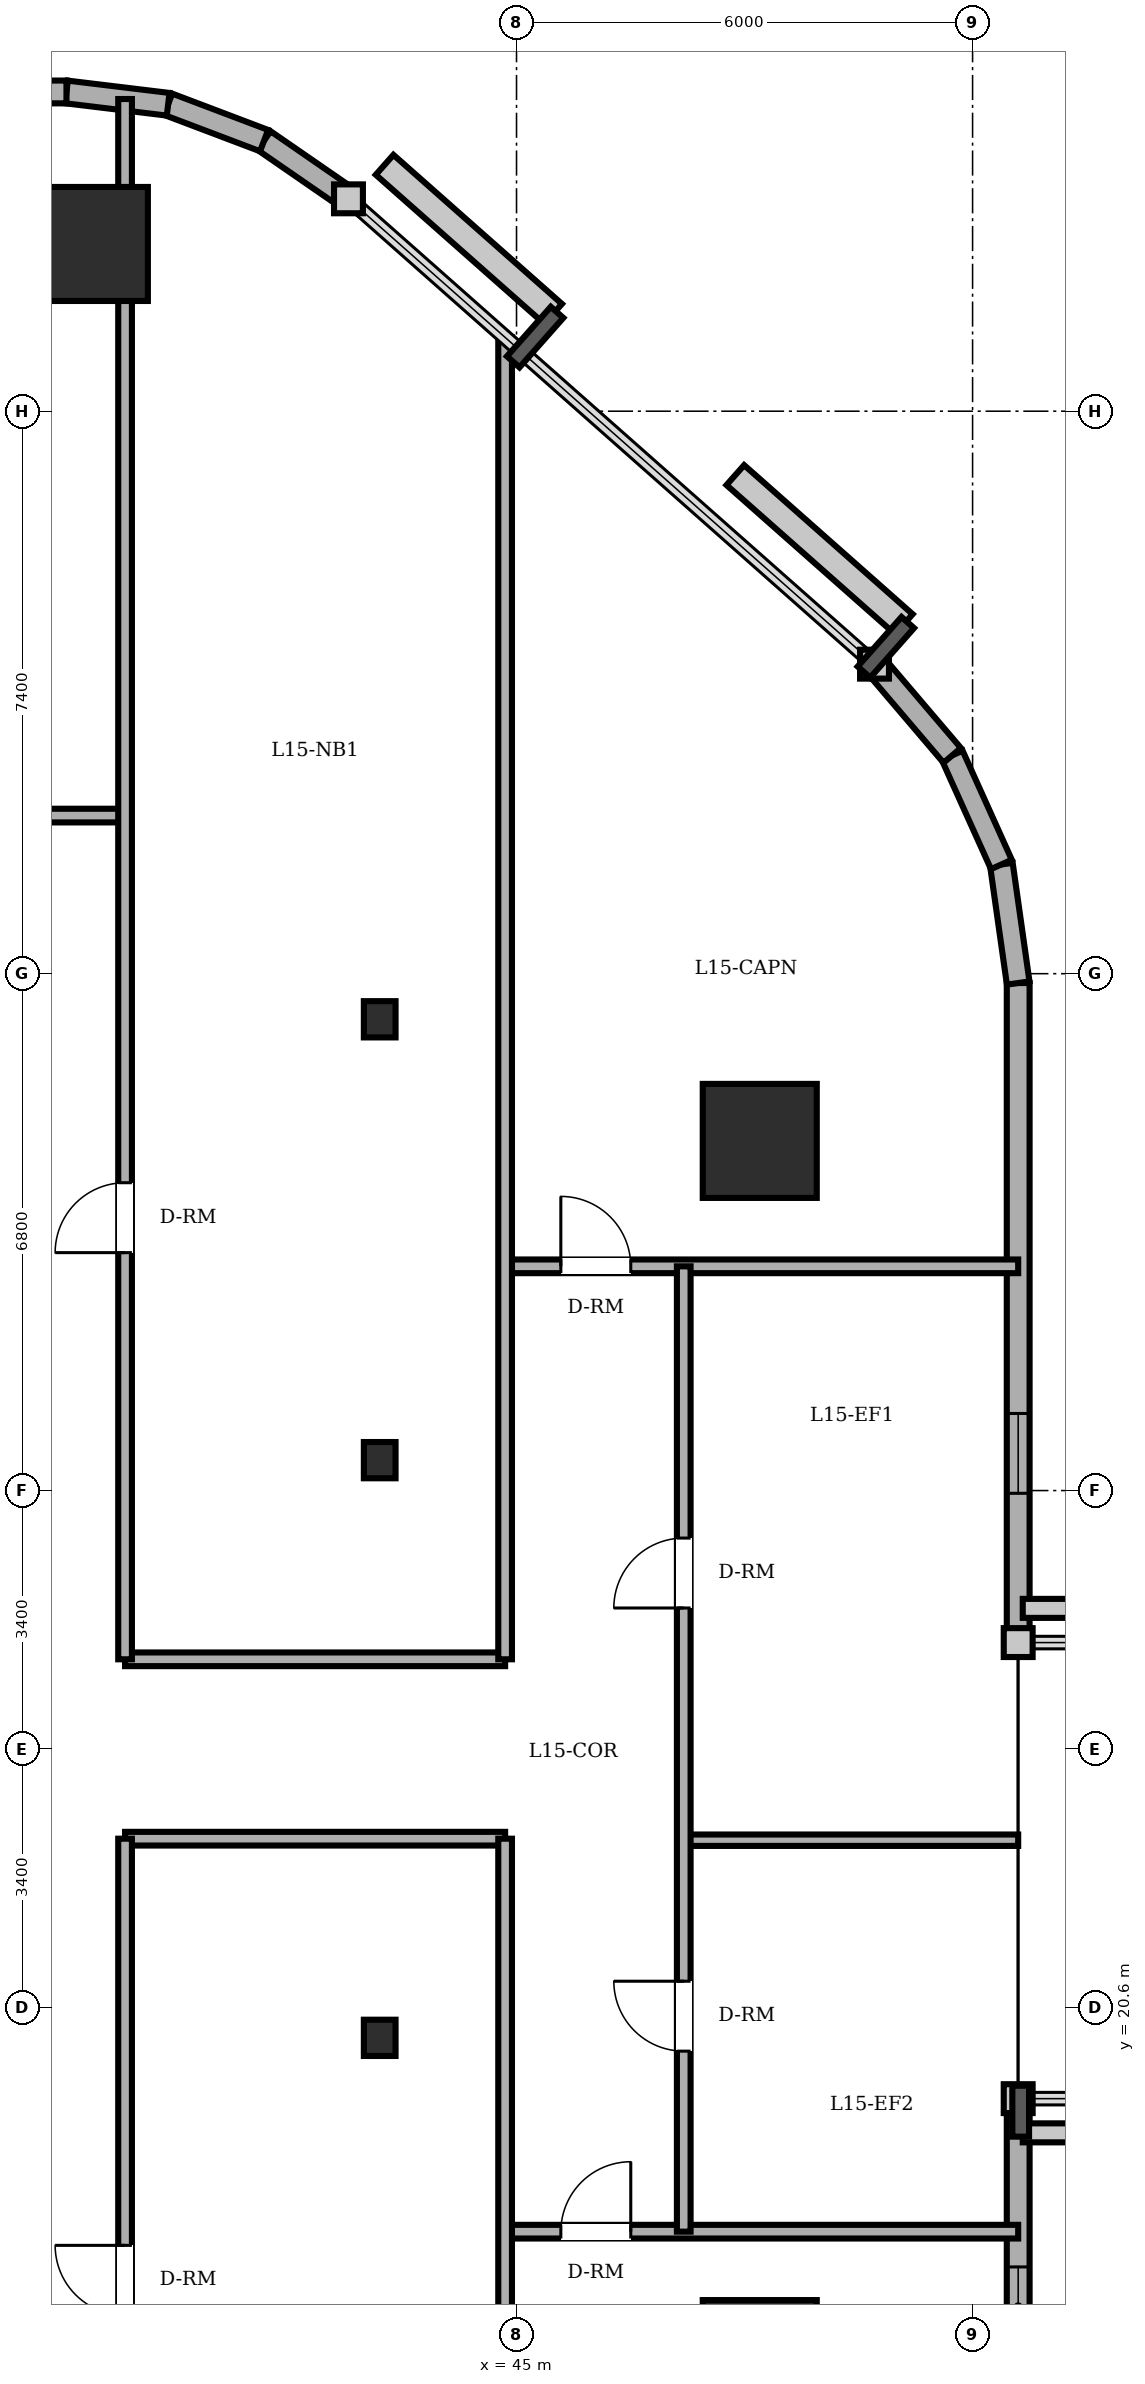
"""IFC4 building model, lengths in metres.
Left out: names, types, materials, properties, quantities, classifications, styles, units other than length and angle.
Written with IfcOpenShell. Run it as: python <this file> out.ifc"""

import sys

from ifc_helpers import new_model, si_unit, direction, frame, frame_2d, origin, origin_2d, place, context, subcontext, project, spatial, rectangle, circle, i_section, extrude, element, fill, save


model = new_model("IFC4")
c1 = context("Model", 3, precision=1e-05, world=origin(), true_north=direction((0.0, 1.0)))
c2 = subcontext(c1, "Body", "Model", "MODEL_VIEW")
j1 = project(units=[si_unit("LENGTHUNIT", "METRE"), si_unit("PLANEANGLEUNIT", "RADIAN")], contexts=[c1])
p1 = place(None, origin())
s1 = spatial("IfcSite", under=j1, at=p1, CompositionType="ELEMENT")
p2 = place(p1, origin())
s2 = spatial("IfcBuilding", under=s1, at=p2, CompositionType="ELEMENT")
p3 = place(p2, frame((0.0, 0.0, 57.6)))
s3 = spatial("IfcBuildingStorey", under=s2, at=p3, CompositionType="ELEMENT", Elevation=57.6)
for number, where, z_axis, x_axis in (
    (1, (48.2, 16.0, 0.0), (0.0, 0.0, 1.0), (1.0, 0.0, 0.0)),
    (2, (48.2, 32.0, 0.0), (0.0, 0.0, 1.0), (1.0, 0.0, 0.0)),
    (3, (39.4, 43.8, 0.0), (0.0, 0.0, 1.0), (1.0, 0.0, 0.0)),
):
    element("IfcColumn", number, at=place(p3, frame(where, z_axis=z_axis, x_axis=x_axis)), inside=s3, PredefinedType="COLUMN", context=c2, shape_type="SweptSolid", body=[
        extrude(circle(Radius=0.75, at=origin_2d()), origin(), (0.0, 0.0, 1.0), 3.6),
    ])
for number, where, z_axis, x_axis in (
    (4, (43.2, 20.2, 0.0), (0.0, 0.0, 1.0), (1.0, 0.0, 0.0)),
    (5, (43.2, 27.8, 0.0), (0.0, 0.0, 1.0), (1.0, 0.0, 0.0)),
    (6, (43.2, 33.6, 0.0), (0.0, 0.0, 1.0), (1.0, 0.0, 0.0)),
):
    element("IfcColumn", number, at=place(p3, frame(where, z_axis=z_axis, x_axis=x_axis)), inside=s3, PredefinedType="COLUMN", context=c2, shape_type="SweptSolid", body=[
        extrude(i_section(OverallWidth=0.417, OverallDepth=0.477, WebThickness=0.036, FlangeThickness=0.057, FilletRadius=0.015, at=origin_2d()), origin(), (0.0, 0.0, 1.0), 3.6),
    ])
p4 = place(p3, frame((51.6, 13.923, 0.0), z_axis=(0.0, 0.0, 1.0), x_axis=(0.0, 1.0, 0.0)))
e7 = element("IfcWall", 7, at=p4, inside=s3, PredefinedType="SOLIDWALL", context=c2, shape_type="SweptSolid", body=[
    extrude(rectangle(XDim=5.477, YDim=0.3, at=frame_2d((2.738, 0.0))), origin(), (0.0, 0.0, 1.0), 3.4),
])
p5 = place(p4, frame((2.213, 0.0, 0.85)))
e8 = element("IfcOpeningElement", 8, at=p5, cuts=e7, PredefinedType="OPENING", context=c2, shape_type="SweptSolid", body=[
    extrude(rectangle(XDim=1.05, YDim=1.55, at=frame_2d((0.525, 0.775))), frame((0.0, 0.16, 0.0), z_axis=(0.0, -1.0, 0.0), x_axis=(1.0, 0.0, 0.0)), (0.0, 0.0, 1.0), 0.32),
])
p6 = place(p3, frame((51.6, 25.4, 0.0), z_axis=(0.0, 0.0, 1.0), x_axis=(0.0, 1.0, 0.0)))
e9 = element("IfcWall", 9, at=p6, inside=s3, PredefinedType="SOLIDWALL", context=c2, shape_type="SweptSolid", body=[
    extrude(rectangle(XDim=8.677, YDim=0.3, at=frame_2d((4.338, 0.0))), origin(), (0.0, 0.0, 1.0), 3.4),
])
p7 = place(p6, frame((1.964, 0.0, 0.85)))
e10 = element("IfcOpeningElement", 10, at=p7, cuts=e9, PredefinedType="OPENING", context=c2, shape_type="SweptSolid", body=[
    extrude(rectangle(XDim=1.05, YDim=1.55, at=frame_2d((0.525, 0.775))), frame((0.0, 0.16, 0.0), z_axis=(0.0, -1.0, 0.0), x_axis=(1.0, 0.0, 0.0)), (0.0, 0.0, 1.0), 0.32),
])
p8 = place(p3, frame((51.6, 34.077, 0.0), z_axis=(0.0, 0.0, 1.0), x_axis=(-0.140380048512, 0.990097693149, 0.0)))
e11 = element("IfcWall", 11, at=p8, inside=s3, PredefinedType="SOLIDWALL", context=c2, shape_type="SweptSolid", body=[
    extrude(rectangle(XDim=1.576, YDim=0.3, at=frame_2d((0.788, 0.0))), origin(), (0.0, 0.0, 1.0), 3.4),
])
p9 = place(p3, frame((51.379, 35.637, 0.0), z_axis=(0.0, 0.0, 1.0), x_axis=(-0.410996558744, 0.911636895206, 0.0)))
e12 = element("IfcWall", 12, at=p9, inside=s3, PredefinedType="SOLIDWALL", context=c2, shape_type="SweptSolid", body=[
    extrude(rectangle(XDim=1.574, YDim=0.3, at=frame_2d((0.787, 0.0))), origin(), (0.0, 0.0, 1.0), 3.4),
])
p10 = place(p3, frame((50.732, 37.072, 0.0), z_axis=(0.0, 0.0, 1.0), x_axis=(-0.648389989909, 0.7613083613, 0.0)))
e13 = element("IfcWall", 13, at=p10, inside=s3, PredefinedType="SOLIDWALL", context=c2, shape_type="SweptSolid", body=[
    extrude(rectangle(XDim=1.576, YDim=0.3, at=frame_2d((0.788, 0.0))), origin(), (0.0, 0.0, 1.0), 3.4),
])
p11 = place(p3, frame((42.789, 44.394, 0.0), z_axis=(0.0, 0.0, 1.0), x_axis=(-0.823116500192, 0.567872544777, 0.0)))
e14 = element("IfcWall", 14, at=p11, inside=s3, PredefinedType="SOLIDWALL", context=c2, shape_type="SweptSolid", body=[
    extrude(rectangle(XDim=1.349, YDim=0.3, at=frame_2d((0.674, 0.0))), origin(), (0.0, 0.0, 1.0), 3.4),
])
p12 = place(p3, frame((41.679, 45.16, 0.0), z_axis=(0.0, 0.0, 1.0), x_axis=(-0.935156721165, 0.354234254216, 0.0)))
e15 = element("IfcWall", 15, at=p12, inside=s3, PredefinedType="SOLIDWALL", context=c2, shape_type="SweptSolid", body=[
    extrude(rectangle(XDim=1.349, YDim=0.3, at=frame_2d((0.675, 0.0))), origin(), (0.0, 0.0, 1.0), 3.4),
])
p13 = place(p3, frame((40.417, 45.638, 0.0), z_axis=(0.0, 0.0, 1.0), x_axis=(-0.992739027259, 0.120288086515, 0.0)))
e16 = element("IfcWall", 16, at=p13, inside=s3, PredefinedType="SOLIDWALL", context=c2, shape_type="SweptSolid", body=[
    extrude(rectangle(XDim=1.348, YDim=0.3, at=frame_2d((0.674, 0.0))), origin(), (0.0, 0.0, 1.0), 3.4),
])
p14 = place(p3, frame((39.079, 45.8, 0.0), z_axis=(0.0, 0.0, 1.0), x_axis=(-1.0, 0.0, 0.0)))
e17 = element("IfcWall", 17, at=p14, inside=s3, PredefinedType="SOLIDWALL", context=c2, shape_type="SweptSolid", body=[
    extrude(rectangle(XDim=30.079, YDim=0.3, at=frame_2d((15.04, 0.0))), origin(), (0.0, 0.0, 1.0), 3.4),
])
p15 = place(p14, frame((24.079, 0.0, 0.0)))
e18 = element("IfcOpeningElement", 18, at=p15, cuts=e17, PredefinedType="OPENING", context=c2, shape_type="SweptSolid", body=[
    extrude(rectangle(XDim=0.95, YDim=2.2, at=frame_2d((0.475, 1.1))), frame((0.0, 0.16, 0.0), z_axis=(0.0, -1.0, 0.0), x_axis=(1.0, 0.0, 0.0)), (0.0, 0.0, 1.0), 0.32),
])
p16 = place(p14, frame((2.226, 0.0, 0.85)))
e19 = element("IfcOpeningElement", 19, at=p16, cuts=e17, PredefinedType="OPENING", context=c2, shape_type="SweptSolid", body=[
    extrude(rectangle(XDim=1.8, YDim=1.55, at=frame_2d((0.9, 0.775))), frame((0.0, 0.16, 0.0), z_axis=(0.0, -1.0, 0.0), x_axis=(1.0, 0.0, 0.0)), (0.0, 0.0, 1.0), 0.32),
])
p17 = place(p14, frame((5.003, 0.0, 0.85)))
e20 = element("IfcOpeningElement", 20, at=p17, cuts=e17, PredefinedType="OPENING", context=c2, shape_type="SweptSolid", body=[
    extrude(rectangle(XDim=1.8, YDim=1.55, at=frame_2d((0.9, 0.775))), frame((0.0, 0.16, 0.0), z_axis=(0.0, -1.0, 0.0), x_axis=(1.0, 0.0, 0.0)), (0.0, 0.0, 1.0), 0.32),
])
p18 = place(p14, frame((10.179, 0.0, 0.85)))
e21 = element("IfcOpeningElement", 21, at=p18, cuts=e17, PredefinedType="OPENING", context=c2, shape_type="SweptSolid", body=[
    extrude(rectangle(XDim=1.8, YDim=1.55, at=frame_2d((0.9, 0.775))), frame((0.0, 0.16, 0.0), z_axis=(0.0, -1.0, 0.0), x_axis=(1.0, 0.0, 0.0)), (0.0, 0.0, 1.0), 0.32),
])
p19 = place(p14, frame((12.579, 0.0, 0.85)))
e22 = element("IfcOpeningElement", 22, at=p19, cuts=e17, PredefinedType="OPENING", context=c2, shape_type="SweptSolid", body=[
    extrude(rectangle(XDim=1.8, YDim=1.55, at=frame_2d((0.9, 0.775))), frame((0.0, 0.16, 0.0), z_axis=(0.0, -1.0, 0.0), x_axis=(1.0, 0.0, 0.0)), (0.0, 0.0, 1.0), 0.32),
])
p20 = place(p14, frame((19.596, 0.0, 0.85)))
e23 = element("IfcOpeningElement", 23, at=p20, cuts=e17, PredefinedType="OPENING", context=c2, shape_type="SweptSolid", body=[
    extrude(rectangle(XDim=1.8, YDim=1.55, at=frame_2d((0.9, 0.775))), frame((0.0, 0.16, 0.0), z_axis=(0.0, -1.0, 0.0), x_axis=(1.0, 0.0, 0.0)), (0.0, 0.0, 1.0), 0.32),
])
p21 = place(p3, frame((44.85, 17.65, 0.0), z_axis=(0.0, 0.0, 1.0), x_axis=(1.0, 0.0, 0.0)))
e24 = element("IfcWall", 24, at=p21, inside=s3, PredefinedType="PARTITIONING", context=c2, shape_type="SweptSolid", body=[
    extrude(rectangle(XDim=6.75, YDim=0.18, at=frame_2d((3.375, 0.0))), origin(), (0.0, 0.0, 1.0), 3.4),
])
p22 = place(p21, frame((0.733, 0.0, 0.0)))
e25 = element("IfcOpeningElement", 25, at=p22, cuts=e24, PredefinedType="OPENING", context=c2, shape_type="SweptSolid", body=[
    extrude(rectangle(XDim=0.92, YDim=2.1, at=frame_2d((0.46, 1.05))), frame((0.0, 0.1, 0.0), z_axis=(0.0, -1.0, 0.0), x_axis=(1.0, 0.0, 0.0)), (0.0, 0.0, 1.0), 0.2),
])
p23 = place(p3, frame((39.85, 22.82, 0.0), z_axis=(0.0, 0.0, 1.0), x_axis=(1.0, 0.0, 0.0)))
e26 = element("IfcWall", 26, at=p23, inside=s3, PredefinedType="PARTITIONING", context=c2, shape_type="SweptSolid", body=[
    extrude(rectangle(XDim=5.0, YDim=0.18, at=frame_2d((2.5, 0.0))), origin(), (0.0, 0.0, 1.0), 3.4),
])
p24 = place(p3, frame((47.2, 22.8, 0.0), z_axis=(0.0, 0.0, 1.0), x_axis=(1.0, 0.0, 0.0)))
e27 = element("IfcWall", 27, at=p24, inside=s3, PredefinedType="PARTITIONING", context=c2, shape_type="SweptSolid", body=[
    extrude(rectangle(XDim=4.4, YDim=0.15, at=frame_2d((2.2, 0.0))), origin(), (0.0, 0.0, 1.0), 3.4),
])
p25 = place(p3, frame((39.85, 25.18, 0.0), z_axis=(0.0, 0.0, 1.0), x_axis=(1.0, 0.0, 0.0)))
e28 = element("IfcWall", 28, at=p25, inside=s3, PredefinedType="PARTITIONING", context=c2, shape_type="SweptSolid", body=[
    extrude(rectangle(XDim=5.0, YDim=0.18, at=frame_2d((2.5, 0.0))), origin(), (0.0, 0.0, 1.0), 3.4),
])
p26 = place(p3, frame((44.85, 30.35, 0.0), z_axis=(0.0, 0.0, 1.0), x_axis=(1.0, 0.0, 0.0)))
e29 = element("IfcWall", 29, at=p26, inside=s3, PredefinedType="PARTITIONING", context=c2, shape_type="SweptSolid", body=[
    extrude(rectangle(XDim=6.75, YDim=0.18, at=frame_2d((3.375, 0.0))), origin(), (0.0, 0.0, 1.0), 3.4),
])
p27 = place(p26, frame((0.733, 0.0, 0.0)))
e30 = element("IfcOpeningElement", 30, at=p27, cuts=e29, PredefinedType="OPENING", context=c2, shape_type="SweptSolid", body=[
    extrude(rectangle(XDim=0.92, YDim=2.1, at=frame_2d((0.46, 1.05))), frame((0.0, 0.1, 0.0), z_axis=(0.0, -1.0, 0.0), x_axis=(1.0, 0.0, 0.0)), (0.0, 0.0, 1.0), 0.2),
])
p28 = place(p3, frame((3.4, 36.28, 0.0), z_axis=(0.0, 0.0, 1.0), x_axis=(1.0, 0.0, 0.0)))
e31 = element("IfcWall", 31, at=p28, inside=s3, PredefinedType="PARTITIONING", context=c2, shape_type="SweptSolid", body=[
    extrude(rectangle(XDim=36.45, YDim=0.18, at=frame_2d((18.225, 0.0))), origin(), (0.0, 0.0, 1.0), 3.4),
])
p29 = place(p28, frame((21.05, 0.0, 0.0)))
e32 = element("IfcOpeningElement", 32, at=p29, cuts=e31, PredefinedType="OPENING", context=c2, shape_type="SweptSolid", body=[
    extrude(rectangle(XDim=0.9, YDim=2.1, at=frame_2d((0.45, 1.05))), frame((0.0, 0.1, 0.0), z_axis=(0.0, -1.0, 0.0), x_axis=(1.0, 0.0, 0.0)), (0.0, 0.0, 1.0), 0.2),
])
p30 = place(p28, frame((24.67, 0.0, 0.0)))
e33 = element("IfcOpeningElement", 33, at=p30, cuts=e31, PredefinedType="OPENING", context=c2, shape_type="SweptSolid", body=[
    extrude(rectangle(XDim=0.86, YDim=2.1, at=frame_2d((0.43, 1.05))), frame((0.0, 0.1, 0.0), z_axis=(0.0, -1.0, 0.0), x_axis=(1.0, 0.0, 0.0)), (0.0, 0.0, 1.0), 0.2),
])
p31 = place(p28, frame((10.7, 0.0, 0.0)))
e34 = element("IfcOpeningElement", 34, at=p31, cuts=e31, PredefinedType="OPENING", context=c2, shape_type="SweptSolid", body=[
    extrude(rectangle(XDim=1.0, YDim=2.15, at=frame_2d((0.5, 1.075))), frame((0.0, 0.1, 0.0), z_axis=(0.0, -1.0, 0.0), x_axis=(1.0, 0.0, 0.0)), (0.0, 0.0, 1.0), 0.2),
])
p32 = place(p28, frame((30.965, 0.0, 0.0)))
e35 = element("IfcOpeningElement", 35, at=p32, cuts=e31, PredefinedType="OPENING", context=c2, shape_type="SweptSolid", body=[
    extrude(rectangle(XDim=1.0, YDim=2.15, at=frame_2d((0.5, 1.075))), frame((0.0, 0.1, 0.0), z_axis=(0.0, -1.0, 0.0), x_axis=(1.0, 0.0, 0.0)), (0.0, 0.0, 1.0), 0.2),
])
p33 = place(p3, frame((39.85, 2.293, 0.0), z_axis=(0.0, 0.0, 1.0), x_axis=(0.0, 1.0, 0.0)))
e36 = element("IfcWall", 36, at=p33, inside=s3, PredefinedType="PARTITIONING", context=c2, shape_type="SweptSolid", body=[
    extrude(rectangle(XDim=20.527, YDim=0.18, at=frame_2d((10.264, 0.0))), origin(), (0.0, 0.0, 1.0), 2.782),
])
p34 = place(p33, frame((14.257, 0.0, 0.0)))
e37 = element("IfcOpeningElement", 37, at=p34, cuts=e36, PredefinedType="OPENING", context=c2, shape_type="SweptSolid", body=[
    extrude(rectangle(XDim=0.92, YDim=2.1, at=frame_2d((0.46, 1.05))), frame((0.0, 0.1, 0.0), z_axis=(0.0, -1.0, 0.0), x_axis=(1.0, 0.0, 0.0)), (0.0, 0.0, 1.0), 0.2),
])
p35 = place(p3, frame((39.85, 25.18, 0.0), z_axis=(0.0, 0.0, 1.0), x_axis=(0.0, 1.0, 0.0)))
e38 = element("IfcWall", 38, at=p35, inside=s3, PredefinedType="PARTITIONING", context=c2, shape_type="SweptSolid", body=[
    extrude(rectangle(XDim=20.527, YDim=0.18, at=frame_2d((10.264, 0.0))), origin(), (0.0, 0.0, 1.0), 2.782),
])
p36 = place(p35, frame((5.35, 0.0, 0.0)))
e39 = element("IfcOpeningElement", 39, at=p36, cuts=e38, PredefinedType="OPENING", context=c2, shape_type="SweptSolid", body=[
    extrude(rectangle(XDim=0.92, YDim=2.1, at=frame_2d((0.46, 1.05))), frame((0.0, 0.1, 0.0), z_axis=(0.0, -1.0, 0.0), x_axis=(1.0, 0.0, 0.0)), (0.0, 0.0, 1.0), 0.2),
])
for number, where, z_axis, x_axis in (
    (40, (44.85, 5.429, 0.0), (0.0, 0.0, 1.0), (0.0, 1.0, 0.0)),
    (41, (44.85, 25.18, 0.0), (0.0, 0.0, 1.0), (0.0, 1.0, 0.0)),
):
    element("IfcWall", number, at=place(p3, frame(where, z_axis=z_axis, x_axis=x_axis)), inside=s3, PredefinedType="PARTITIONING", context=c2, shape_type="SweptSolid", body=[
        extrude(rectangle(XDim=17.391, YDim=0.18, at=frame_2d((8.696, 0.0))), origin(), (0.0, 0.0, 1.0), 3.4),
    ])
p37 = place(p3, frame((47.2, 17.65, 0.0), z_axis=(0.0, 0.0, 1.0), x_axis=(0.0, 1.0, 0.0)))
e42 = element("IfcWall", 42, at=p37, inside=s3, PredefinedType="PARTITIONING", context=c2, shape_type="SweptSolid", body=[
    extrude(rectangle(XDim=12.7, YDim=0.18, at=frame_2d((6.35, 0.0))), origin(), (0.0, 0.0, 1.0), 3.4),
])
p38 = place(p37, frame((8.205, 0.0, 0.0)))
e43 = element("IfcOpeningElement", 43, at=p38, cuts=e42, PredefinedType="OPENING", context=c2, shape_type="SweptSolid", body=[
    extrude(rectangle(XDim=0.92, YDim=2.1, at=frame_2d((0.46, 1.05))), frame((0.0, 0.1, 0.0), z_axis=(0.0, -1.0, 0.0), x_axis=(1.0, 0.0, 0.0)), (0.0, 0.0, 1.0), 0.2),
])
p39 = place(p37, frame((2.375, 0.0, 0.0)))
e44 = element("IfcOpeningElement", 44, at=p39, cuts=e42, PredefinedType="OPENING", context=c2, shape_type="SweptSolid", body=[
    extrude(rectangle(XDim=0.92, YDim=2.1, at=frame_2d((0.46, 1.05))), frame((0.0, 0.1, 0.0), z_axis=(0.0, -1.0, 0.0), x_axis=(1.0, 0.0, 0.0)), (0.0, 0.0, 1.0), 0.2),
])
p40 = place(p5, origin())
e45 = element("IfcWindow", 45, at=p40, inside=s3, PartitioningType="SINGLE_PANEL", PredefinedType="WINDOW", context=c2, shape_type="SweptSolid", body=[
    extrude(rectangle(XDim=1.05, YDim=1.55, at=frame_2d((0.525, 0.775))), frame((0.0, 0.03, 0.0), z_axis=(0.0, -1.0, 0.0), x_axis=(1.0, 0.0, 0.0)), (0.0, 0.0, 1.0), 0.06),
])
fill(e8, e45)
p41 = place(p7, origin())
e46 = element("IfcWindow", 46, at=p41, inside=s3, PartitioningType="SINGLE_PANEL", PredefinedType="WINDOW", context=c2, shape_type="SweptSolid", body=[
    extrude(rectangle(XDim=1.05, YDim=1.55, at=frame_2d((0.525, 0.775))), frame((0.0, 0.03, 0.0), z_axis=(0.0, -1.0, 0.0), x_axis=(1.0, 0.0, 0.0)), (0.0, 0.0, 1.0), 0.06),
])
fill(e10, e46)
p42 = place(p36, origin())
e47 = element("IfcDoor", 47, at=p42, inside=s3, OperationType="SINGLE_SWING_LEFT", PredefinedType="DOOR", context=c2, shape_type="SweptSolid", body=[
    extrude(rectangle(XDim=0.92, YDim=2.1, at=frame_2d((0.46, 1.05))), frame((0.0, 0.025, 0.0), z_axis=(0.0, -1.0, 0.0), x_axis=(1.0, 0.0, 0.0)), (0.0, 0.0, 1.0), 0.05),
])
fill(e39, e47)
p43 = place(p34, origin())
e48 = element("IfcDoor", 48, at=p43, inside=s3, OperationType="SINGLE_SWING_RIGHT", PredefinedType="DOOR", context=c2, shape_type="SweptSolid", body=[
    extrude(rectangle(XDim=0.92, YDim=2.1, at=frame_2d((0.46, 1.05))), frame((0.0, 0.025, 0.0), z_axis=(0.0, -1.0, 0.0), x_axis=(1.0, 0.0, 0.0)), (0.0, 0.0, 1.0), 0.05),
])
fill(e37, e48)
p44 = place(p27, origin())
e49 = element("IfcDoor", 49, at=p44, inside=s3, OperationType="SINGLE_SWING_LEFT", PredefinedType="DOOR", context=c2, shape_type="SweptSolid", body=[
    extrude(rectangle(XDim=0.92, YDim=2.1, at=frame_2d((0.46, 1.05))), frame((0.0, 0.025, 0.0), z_axis=(0.0, -1.0, 0.0), x_axis=(1.0, 0.0, 0.0)), (0.0, 0.0, 1.0), 0.05),
])
fill(e30, e49)
p45 = place(p22, origin())
e50 = element("IfcDoor", 50, at=p45, inside=s3, OperationType="SINGLE_SWING_RIGHT", PredefinedType="DOOR", context=c2, shape_type="SweptSolid", body=[
    extrude(rectangle(XDim=0.92, YDim=2.1, at=frame_2d((0.46, 1.05))), frame((0.0, 0.025, 0.0), z_axis=(0.0, -1.0, 0.0), x_axis=(1.0, 0.0, 0.0)), (0.0, 0.0, 1.0), 0.05),
])
fill(e25, e50)
p46 = place(p38, origin())
e51 = element("IfcDoor", 51, at=p46, inside=s3, OperationType="SINGLE_SWING_LEFT", PredefinedType="DOOR", context=c2, shape_type="SweptSolid", body=[
    extrude(rectangle(XDim=0.92, YDim=2.1, at=frame_2d((0.46, 1.05))), frame((0.0, 0.025, 0.0), z_axis=(0.0, -1.0, 0.0), x_axis=(1.0, 0.0, 0.0)), (0.0, 0.0, 1.0), 0.05),
])
fill(e43, e51)
p47 = place(p39, origin())
e52 = element("IfcDoor", 52, at=p47, inside=s3, OperationType="SINGLE_SWING_RIGHT", PredefinedType="DOOR", context=c2, shape_type="SweptSolid", body=[
    extrude(rectangle(XDim=0.92, YDim=2.1, at=frame_2d((0.46, 1.05))), frame((0.0, 0.025, 0.0), z_axis=(0.0, -1.0, 0.0), x_axis=(1.0, 0.0, 0.0)), (0.0, 0.0, 1.0), 0.05),
])
fill(e44, e52)
save(model, sys.argv[1])
